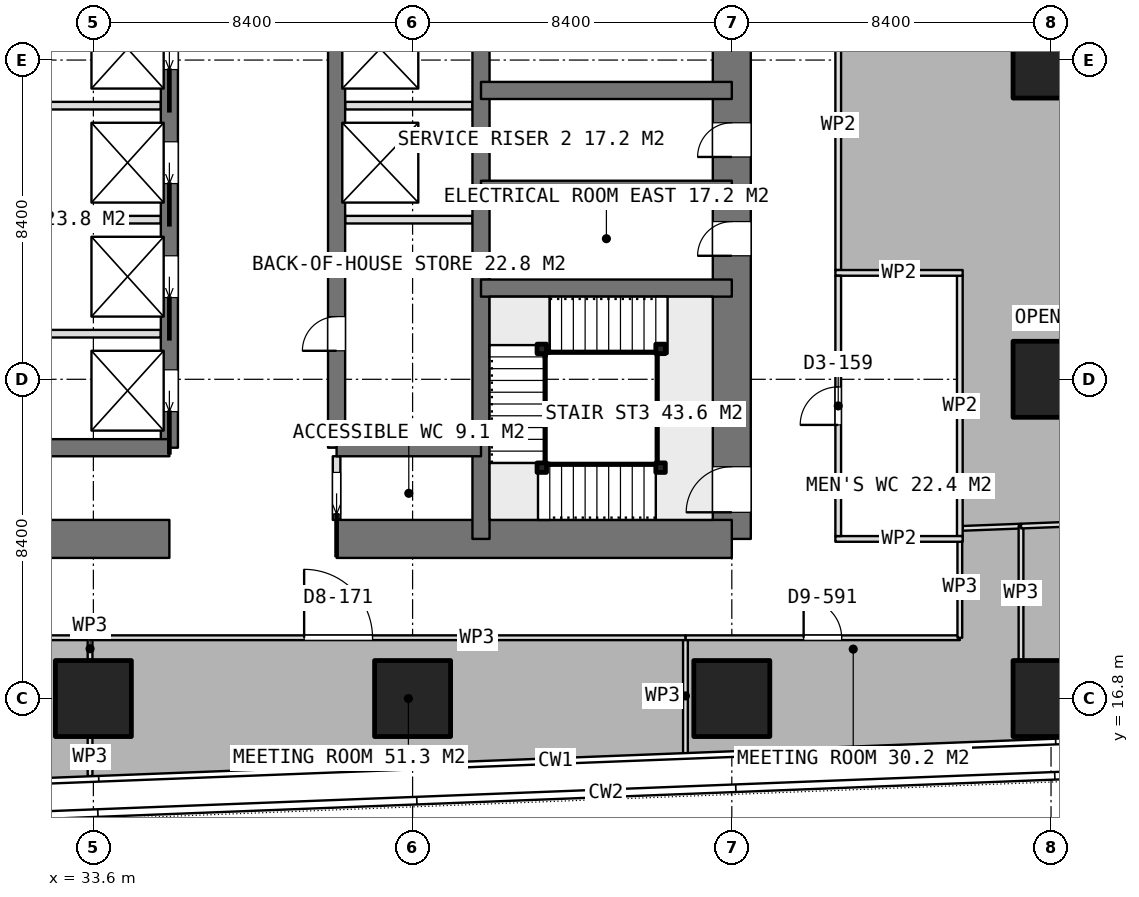
"""IFC4 building model, lengths in metres.
Left out: names, types, materials, properties, quantities, classifications, styles, units other than length and angle.
Written with IfcOpenShell. Run it as: python <this file> out.ifc"""

import sys

from ifc_helpers import new_model, si_unit, direction, frame, frame_2d, origin, origin_2d, place, context, subcontext, project, spatial, rectangle, extrude, element, fill, save


model = new_model("IFC4")
c1 = context("Model", 3, precision=1e-05, world=origin(), true_north=direction((0.0, 1.0)))
c2 = subcontext(c1, "Body", "Model", "MODEL_VIEW")
j1 = project(units=[si_unit("LENGTHUNIT", "METRE"), si_unit("PLANEANGLEUNIT", "RADIAN")], contexts=[c1])
p1 = place(None, origin())
s1 = spatial("IfcSite", under=j1, at=p1, CompositionType="ELEMENT")
p2 = place(p1, origin())
s2 = spatial("IfcBuilding", under=s1, at=p2, CompositionType="ELEMENT")
p3 = place(p2, frame((0.0, 0.0, 147.8)))
s3 = spatial("IfcBuildingStorey", under=s2, at=p3, CompositionType="ELEMENT", Elevation=147.8)
p4 = place(p3, frame((25.2, 21.0, 0.0), z_axis=(0.0, 0.0, 1.0), x_axis=(1.0, 0.0, 0.0)))
e1 = element("IfcWall", 1, at=p4, inside=s3, PredefinedType="SHEAR", context=c2, shape_type="SweptSolid", body=[
    extrude(rectangle(XDim=10.4, YDim=1.0, at=frame_2d((5.2, 0.0))), origin(), (0.0, 0.0, 1.0), 3.75),
])
p5 = place(p3, frame((40.0, 21.0, 0.0), z_axis=(0.0, 0.0, 1.0), x_axis=(1.0, 0.0, 0.0)))
e2 = element("IfcWall", 2, at=p5, inside=s3, PredefinedType="SHEAR", context=c2, shape_type="SweptSolid", body=[
    extrude(rectangle(XDim=10.4, YDim=1.0, at=frame_2d((5.2, 0.0))), origin(), (0.0, 0.0, 1.0), 3.75),
])
p6 = place(p3, frame((50.4, 21.0, 0.0), z_axis=(0.0, 0.0, 1.0), x_axis=(0.0, 1.0, 0.0)))
e3 = element("IfcWall", 3, at=p6, inside=s3, PredefinedType="SHEAR", context=c2, shape_type="SweptSolid", body=[
    extrude(rectangle(XDim=25.2, YDim=1.0, at=frame_2d((12.6, 0.0))), origin(), (0.0, 0.0, 1.0), 3.75),
])
p7 = place(p6, frame((16.2, 0.0, 0.0)))
e4 = element("IfcOpeningElement", 4, at=p7, cuts=e3, PredefinedType="OPENING", context=c2, shape_type="SweptSolid", body=[
    extrude(rectangle(XDim=1.2, YDim=2.1, at=frame_2d((0.6, 1.05))), frame((0.0, 0.51, 0.0), z_axis=(0.0, -1.0, 0.0), x_axis=(1.0, 0.0, 0.0)), (0.0, 0.0, 1.0), 1.02),
])
p8 = place(p6, frame((10.05, 0.0, 0.0)))
e5 = element("IfcOpeningElement", 5, at=p8, cuts=e3, PredefinedType="OPENING", context=c2, shape_type="SweptSolid", body=[
    extrude(rectangle(XDim=0.9, YDim=2.1, at=frame_2d((0.45, 1.05))), frame((0.0, 0.51, 0.0), z_axis=(0.0, -1.0, 0.0), x_axis=(1.0, 0.0, 0.0)), (0.0, 0.0, 1.0), 1.02),
])
p9 = place(p6, frame((7.45, 0.0, 0.0)))
e6 = element("IfcOpeningElement", 6, at=p9, cuts=e3, PredefinedType="OPENING", context=c2, shape_type="SweptSolid", body=[
    extrude(rectangle(XDim=0.9, YDim=2.1, at=frame_2d((0.45, 1.05))), frame((0.0, 0.51, 0.0), z_axis=(0.0, -1.0, 0.0), x_axis=(1.0, 0.0, 0.0)), (0.0, 0.0, 1.0), 1.02),
])
p10 = place(p6, frame((0.7, 0.0, 0.0)))
e7 = element("IfcOpeningElement", 7, at=p10, cuts=e3, PredefinedType="OPENING", context=c2, shape_type="SweptSolid", body=[
    extrude(rectangle(XDim=1.2, YDim=2.1, at=frame_2d((0.6, 1.05))), frame((0.0, 0.51, 0.0), z_axis=(0.0, -1.0, 0.0), x_axis=(1.0, 0.0, 0.0)), (0.0, 0.0, 1.0), 1.02),
])
p11 = place(p3, frame((43.8, 21.0, 0.0), z_axis=(0.0, 0.0, 1.0), x_axis=(0.0, 1.0, 0.0)))
e8 = element("IfcWall", 8, at=p11, inside=s3, PredefinedType="SHEAR", context=c2, shape_type="SweptSolid", body=[
    extrude(rectangle(XDim=25.2, YDim=0.45, at=frame_2d((12.6, 0.0))), origin(), (0.0, 0.0, 1.0), 3.75),
])
p12 = place(p3, frame((35.6, 23.4, 0.0), z_axis=(0.0, 0.0, 1.0), x_axis=(0.0, 1.0, 0.0)))
e9 = element("IfcWall", 9, at=p12, inside=s3, PredefinedType="SHEAR", context=c2, shape_type="SweptSolid", body=[
    extrude(rectangle(XDim=18.0, YDim=0.45, at=frame_2d((9.0, 0.0))), origin(), (0.0, 0.0, 1.0), 3.75),
])
p13 = place(p12, frame((0.95, 0.0, 0.0)))
e10 = element("IfcOpeningElement", 10, at=p13, cuts=e9, PredefinedType="OPENING", context=c2, shape_type="SweptSolid", body=[
    extrude(rectangle(XDim=1.1, YDim=2.1, at=frame_2d((0.55, 1.05))), frame((0.0, 0.235, 0.0), z_axis=(0.0, -1.0, 0.0), x_axis=(1.0, 0.0, 0.0)), (0.0, 0.0, 1.0), 0.47),
])
p14 = place(p12, frame((3.95, 0.0, 0.0)))
e11 = element("IfcOpeningElement", 11, at=p14, cuts=e9, PredefinedType="OPENING", context=c2, shape_type="SweptSolid", body=[
    extrude(rectangle(XDim=1.1, YDim=2.1, at=frame_2d((0.55, 1.05))), frame((0.0, 0.235, 0.0), z_axis=(0.0, -1.0, 0.0), x_axis=(1.0, 0.0, 0.0)), (0.0, 0.0, 1.0), 0.47),
])
p15 = place(p12, frame((6.95, 0.0, 0.0)))
e12 = element("IfcOpeningElement", 12, at=p15, cuts=e9, PredefinedType="OPENING", context=c2, shape_type="SweptSolid", body=[
    extrude(rectangle(XDim=1.1, YDim=2.1, at=frame_2d((0.55, 1.05))), frame((0.0, 0.235, 0.0), z_axis=(0.0, -1.0, 0.0), x_axis=(1.0, 0.0, 0.0)), (0.0, 0.0, 1.0), 0.47),
])
p16 = place(p12, frame((9.95, 0.0, 0.0)))
e13 = element("IfcOpeningElement", 13, at=p16, cuts=e9, PredefinedType="OPENING", context=c2, shape_type="SweptSolid", body=[
    extrude(rectangle(XDim=1.1, YDim=2.1, at=frame_2d((0.55, 1.05))), frame((0.0, 0.235, 0.0), z_axis=(0.0, -1.0, 0.0), x_axis=(1.0, 0.0, 0.0)), (0.0, 0.0, 1.0), 0.47),
])
p17 = place(p12, frame((12.95, 0.0, 0.0)))
e14 = element("IfcOpeningElement", 14, at=p17, cuts=e9, PredefinedType="OPENING", context=c2, shape_type="SweptSolid", body=[
    extrude(rectangle(XDim=1.1, YDim=2.1, at=frame_2d((0.55, 1.05))), frame((0.0, 0.235, 0.0), z_axis=(0.0, -1.0, 0.0), x_axis=(1.0, 0.0, 0.0)), (0.0, 0.0, 1.0), 0.47),
])
p18 = place(p12, frame((15.95, 0.0, 0.0)))
e15 = element("IfcOpeningElement", 15, at=p18, cuts=e9, PredefinedType="OPENING", context=c2, shape_type="SweptSolid", body=[
    extrude(rectangle(XDim=1.1, YDim=2.1, at=frame_2d((0.55, 1.05))), frame((0.0, 0.235, 0.0), z_axis=(0.0, -1.0, 0.0), x_axis=(1.0, 0.0, 0.0)), (0.0, 0.0, 1.0), 0.47),
])
p19 = place(p3, frame((40.0, 23.4, 0.0), z_axis=(0.0, 0.0, 1.0), x_axis=(0.0, 1.0, 0.0)))
e16 = element("IfcWall", 16, at=p19, inside=s3, PredefinedType="SHEAR", context=c2, shape_type="SweptSolid", body=[
    extrude(rectangle(XDim=18.0, YDim=0.45, at=frame_2d((9.0, 0.0))), origin(), (0.0, 0.0, 1.0), 3.75),
])
p20 = place(p19, frame((2.55, 0.0, 0.0)))
e17 = element("IfcOpeningElement", 17, at=p20, cuts=e16, PredefinedType="OPENING", context=c2, shape_type="SweptSolid", body=[
    extrude(rectangle(XDim=0.9, YDim=2.1, at=frame_2d((0.45, 1.05))), frame((0.0, 0.235, 0.0), z_axis=(0.0, -1.0, 0.0), x_axis=(1.0, 0.0, 0.0)), (0.0, 0.0, 1.0), 0.47),
])
for number, where, z_axis, x_axis in (
    (18, (31.8, 23.4, 0.0), (0.0, 0.0, 1.0), (1.0, 0.0, 0.0)),
    (19, (40.0, 23.4, 0.0), (0.0, 0.0, 1.0), (1.0, 0.0, 0.0)),
):
    element("IfcWall", number, at=place(p3, frame(where, z_axis=z_axis, x_axis=x_axis)), inside=s3, PredefinedType="SHEAR", context=c2, shape_type="SweptSolid", body=[
        extrude(rectangle(XDim=3.8, YDim=0.45, at=frame_2d((1.9, 0.0))), origin(), (0.0, 0.0, 1.0), 3.75),
    ])
for number, where, z_axis, x_axis in (
    (20, (43.8, 27.6, 0.0), (0.0, 0.0, 1.0), (1.0, 0.0, 0.0)),
    (21, (43.8, 30.2, 0.0), (0.0, 0.0, 1.0), (1.0, 0.0, 0.0)),
    (22, (43.8, 32.8, 0.0), (0.0, 0.0, 1.0), (1.0, 0.0, 0.0)),
):
    element("IfcWall", number, at=place(p3, frame(where, z_axis=z_axis, x_axis=x_axis)), inside=s3, PredefinedType="SHEAR", context=c2, shape_type="SweptSolid", body=[
        extrude(rectangle(XDim=6.6, YDim=0.45, at=frame_2d((3.3, 0.0))), origin(), (0.0, 0.0, 1.0), 3.75),
    ])
for number, where, z_axis, x_axis in (
    (23, (33.6, 16.8, 0.0), (0.0, 0.0, 1.0), (1.0, 0.0, 0.0)),
    (24, (42.0, 16.8, 0.0), (0.0, 0.0, 1.0), (1.0, 0.0, 0.0)),
    (25, (50.4, 16.8, 0.0), (0.0, 0.0, 1.0), (1.0, 0.0, 0.0)),
    (26, (58.8, 16.8, 0.0), (0.0, 0.0, 1.0), (1.0, 0.0, 0.0)),
    (27, (58.8, 25.2, 0.0), (0.0, 0.0, 1.0), (1.0, 0.0, 0.0)),
    (28, (58.8, 33.6, 0.0), (0.0, 0.0, 1.0), (1.0, 0.0, 0.0)),
):
    element("IfcColumn", number, at=place(p3, frame(where, z_axis=z_axis, x_axis=x_axis)), inside=s3, PredefinedType="COLUMN", context=c2, shape_type="SweptSolid", body=[
        extrude(rectangle(XDim=2.0, YDim=2.0, at=origin_2d()), origin(), (0.0, 0.0, 1.0), 3.75),
    ])
for number, where, z_axis, x_axis in (
    (29, (32.025, 26.4, 0.0), (0.0, 0.0, 1.0), (1.0, 0.0, 0.0)),
    (30, (32.025, 29.4, 0.0), (0.0, 0.0, 1.0), (1.0, 0.0, 0.0)),
    (31, (32.025, 32.4, 0.0), (0.0, 0.0, 1.0), (1.0, 0.0, 0.0)),
):
    element("IfcWall", number, at=place(p3, frame(where, z_axis=z_axis, x_axis=x_axis)), inside=s3, PredefinedType="PARTITIONING", context=c2, shape_type="SweptSolid", body=[
        extrude(rectangle(XDim=3.35, YDim=0.2, at=frame_2d((1.675, 0.0))), origin(), (0.0, 0.0, 1.0), 3.5),
    ])
for number, where, z_axis, x_axis in (
    (32, (40.225, 29.4, 0.0), (0.0, 0.0, 1.0), (1.0, 0.0, 0.0)),
    (33, (40.225, 32.4, 0.0), (0.0, 0.0, 1.0), (1.0, 0.0, 0.0)),
):
    element("IfcWall", number, at=place(p3, frame(where, z_axis=z_axis, x_axis=x_axis)), inside=s3, PredefinedType="PARTITIONING", context=c2, shape_type="SweptSolid", body=[
        extrude(rectangle(XDim=3.35, YDim=0.2, at=frame_2d((1.675, 0.0))), origin(), (0.0, 0.0, 1.0), 3.5),
    ])
p21 = place(p3, frame((40.0, 21.5, 0.0), z_axis=(0.0, 0.0, 1.0), x_axis=(0.0, 1.0, 0.0)))
e34 = element("IfcWall", 34, at=p21, inside=s3, PredefinedType="PARTITIONING", context=c2, shape_type="SweptSolid", body=[
    extrude(rectangle(XDim=1.675, YDim=0.2, at=frame_2d((0.837, 0.0))), origin(), (0.0, 0.0, 1.0), 3.5),
])
p22 = place(p21, frame((0.15, 0.0, 0.0)))
e35 = element("IfcOpeningElement", 35, at=p22, cuts=e34, PredefinedType="OPENING", context=c2, shape_type="SweptSolid", body=[
    extrude(rectangle(XDim=1.1, YDim=2.1, at=frame_2d((0.55, 1.05))), frame((0.0, 0.11, 0.0), z_axis=(0.0, -1.0, 0.0), x_axis=(1.0, 0.0, 0.0)), (0.0, 0.0, 1.0), 0.22),
])
for number, where, z_axis, x_axis in (
    (36, (53.125, 21.0, 0.0), (0.0, 0.0, 1.0), (1.0, 0.0, 0.0)),
    (37, (53.125, 28.0, 0.0), (0.0, 0.0, 1.0), (1.0, 0.0, 0.0)),
):
    element("IfcWall", number, at=place(p3, frame(where, z_axis=z_axis, x_axis=x_axis)), inside=s3, PredefinedType="PARTITIONING", context=c2, shape_type="SweptSolid", body=[
        extrude(rectangle(XDim=3.35, YDim=0.15, at=frame_2d((1.675, 0.0))), origin(), (0.0, 0.0, 1.0), 3.5),
    ])
p23 = place(p3, frame((53.2, 21.075, 0.0), z_axis=(0.0, 0.0, 1.0), x_axis=(0.0, 1.0, 0.0)))
e38 = element("IfcWall", 38, at=p23, inside=s3, PredefinedType="PARTITIONING", context=c2, shape_type="SweptSolid", body=[
    extrude(rectangle(XDim=6.85, YDim=0.15, at=frame_2d((3.425, 0.0))), origin(), (0.0, 0.0, 1.0), 3.5),
])
p24 = place(p23, frame((2.925, 0.0, 0.0)))
e39 = element("IfcOpeningElement", 39, at=p24, cuts=e38, PredefinedType="OPENING", context=c2, shape_type="SweptSolid", body=[
    extrude(rectangle(XDim=1.0, YDim=2.1, at=frame_2d((0.5, 1.05))), frame((0.0, 0.085, 0.0), z_axis=(0.0, -1.0, 0.0), x_axis=(1.0, 0.0, 0.0)), (0.0, 0.0, 1.0), 0.17),
])
p25 = place(p3, frame((56.4, 21.075, 0.0), z_axis=(0.0, 0.0, 1.0), x_axis=(0.0, 1.0, 0.0)))
e40 = element("IfcWall", 40, at=p25, inside=s3, PredefinedType="PARTITIONING", context=c2, shape_type="SweptSolid", body=[
    extrude(rectangle(XDim=6.85, YDim=0.15, at=frame_2d((3.425, 0.0))), origin(), (0.0, 0.0, 1.0), 3.5),
])
p26 = place(p3, frame((56.475, 21.278, 0.0), z_axis=(0.0, 0.0, 1.0), x_axis=(0.999266096652, 0.038304935469, 0.0)))
e41 = element("IfcWall", 41, at=p26, inside=s3, PredefinedType="PARTITIONING", context=c2, shape_type="SweptSolid", body=[
    extrude(rectangle(XDim=1.536, YDim=0.125, at=frame_2d((0.768, 0.0))), origin(), (0.0, 0.0, 1.0), 3.5),
])
p27 = place(p3, frame((58.01, 21.337, 0.0), z_axis=(0.0, 0.0, 1.0), x_axis=(0.0, -1.0, 0.0)))
e42 = element("IfcWall", 42, at=p27, inside=s3, PredefinedType="PARTITIONING", context=c2, shape_type="SweptSolid", body=[
    extrude(rectangle(XDim=3.517, YDim=0.125, at=frame_2d((1.758, 0.0))), origin(), (0.0, 0.0, 1.0), 3.5),
])
p28 = place(p3, frame((49.18, 15.339, 0.0), z_axis=(0.0, 0.0, 1.0), x_axis=(0.0, 1.0, 0.0)))
e43 = element("IfcWall", 43, at=p28, inside=s3, PredefinedType="PARTITIONING", context=c2, shape_type="SweptSolid", body=[
    extrude(rectangle(XDim=3.061, YDim=0.125, at=frame_2d((1.53, 0.0))), origin(), (0.0, 0.0, 1.0), 3.5),
])
p29 = place(p3, frame((49.18, 18.4, 0.0), z_axis=(0.0, 0.0, 1.0), x_axis=(1.0, 0.0, 0.0)))
e44 = element("IfcWall", 44, at=p29, inside=s3, PredefinedType="PARTITIONING", context=c2, shape_type="SweptSolid", body=[
    extrude(rectangle(XDim=7.22, YDim=0.125, at=frame_2d((3.61, 0.0))), origin(), (0.0, 0.0, 1.0), 3.5),
])
p30 = place(p29, frame((3.11, 0.0, 0.0)))
e45 = element("IfcOpeningElement", 45, at=p30, cuts=e44, PredefinedType="OPENING", context=c2, shape_type="SweptSolid", body=[
    extrude(rectangle(XDim=1.0, YDim=2.1, at=frame_2d((0.5, 1.05))), frame((0.0, 0.073, 0.0), z_axis=(0.0, -1.0, 0.0), x_axis=(1.0, 0.0, 0.0)), (0.0, 0.0, 1.0), 0.145),
])
p31 = place(p3, frame((56.4, 18.4, 0.0), z_axis=(0.0, 0.0, 1.0), x_axis=(0.0, 1.0, 0.0)))
e46 = element("IfcWall", 46, at=p31, inside=s3, PredefinedType="PARTITIONING", context=c2, shape_type="SweptSolid", body=[
    extrude(rectangle(XDim=2.674, YDim=0.125, at=frame_2d((1.337, 0.0))), origin(), (0.0, 0.0, 1.0), 3.5),
])
p32 = place(p3, frame((58.011, 21.338, 0.0), z_axis=(0.0, 0.0, 1.0), x_axis=(0.999247292376, 0.038792379151, 0.0)))
e47 = element("IfcWall", 47, at=p32, inside=s3, PredefinedType="PARTITIONING", context=c2, shape_type="SweptSolid", body=[
    extrude(rectangle(XDim=4.619, YDim=0.125, at=frame_2d((2.31, 0.0))), origin(), (0.0, 0.0, 1.0), 3.5),
])
p33 = place(p3, frame((25.38, 18.4, 0.0), z_axis=(0.0, 0.0, 1.0), x_axis=(1.0, 0.0, 0.0)))
e48 = element("IfcWall", 48, at=p33, inside=s3, PredefinedType="PARTITIONING", context=c2, shape_type="SweptSolid", body=[
    extrude(rectangle(XDim=8.133, YDim=0.125, at=frame_2d((4.066, 0.0))), origin(), (0.0, 0.0, 1.0), 3.5),
])
p34 = place(p33, frame((3.567, 0.0, 0.0)))
e49 = element("IfcOpeningElement", 49, at=p34, cuts=e48, PredefinedType="OPENING", context=c2, shape_type="SweptSolid", body=[
    extrude(rectangle(XDim=1.0, YDim=2.1, at=frame_2d((0.5, 1.05))), frame((0.0, 0.073, 0.0), z_axis=(0.0, -1.0, 0.0), x_axis=(1.0, 0.0, 0.0)), (0.0, 0.0, 1.0), 0.145),
])
p35 = place(p3, frame((33.513, 18.4, 0.0), z_axis=(0.0, 0.0, 1.0), x_axis=(0.0, -1.0, 0.0)))
e50 = element("IfcWall", 50, at=p35, inside=s3, PredefinedType="PARTITIONING", context=c2, shape_type="SweptSolid", body=[
    extrude(rectangle(XDim=0.58, YDim=0.125, at=frame_2d((0.29, 0.0))), origin(), (0.0, 0.0, 1.0), 3.5),
])
p36 = place(p3, frame((33.513, 15.78, 0.0), z_axis=(0.0, 0.0, 1.0), x_axis=(0.0, -1.0, 0.0)))
e51 = element("IfcWall", 51, at=p36, inside=s3, PredefinedType="PARTITIONING", context=c2, shape_type="SweptSolid", body=[
    extrude(rectangle(XDim=1.02, YDim=0.125, at=frame_2d((0.51, 0.0))), origin(), (0.0, 0.0, 1.0), 3.5),
])
p37 = place(p3, frame((53.2, 28.075, 0.0), z_axis=(0.0, 0.0, 1.0), x_axis=(0.0, 1.0, 0.0)))
e52 = element("IfcWall", 52, at=p37, inside=s3, PredefinedType="PARTITIONING", context=c2, shape_type="SweptSolid", body=[
    extrude(rectangle(XDim=7.615, YDim=0.15, at=frame_2d((3.808, 0.0))), origin(), (0.0, 0.0, 1.0), 3.5),
])
p38 = place(p3, frame((33.513, 18.4, 0.0), z_axis=(0.0, 0.0, 1.0), x_axis=(1.0, 0.0, 0.0)))
e53 = element("IfcWall", 53, at=p38, inside=s3, PredefinedType="PARTITIONING", context=c2, shape_type="SweptSolid", body=[
    extrude(rectangle(XDim=15.666, YDim=0.125, at=frame_2d((7.833, 0.0))), origin(), (0.0, 0.0, 1.0), 3.5),
])
p39 = place(p38, frame((5.633, 0.0, 0.0)))
e54 = element("IfcOpeningElement", 54, at=p39, cuts=e53, PredefinedType="OPENING", context=c2, shape_type="SweptSolid", body=[
    extrude(rectangle(XDim=1.8, YDim=2.1, at=frame_2d((0.9, 1.05))), frame((0.0, 0.073, 0.0), z_axis=(0.0, -1.0, 0.0), x_axis=(1.0, 0.0, 0.0)), (0.0, 0.0, 1.0), 0.145),
])
for number, where, z_axis, x_axis in (
    (55, (48.525, 22.875, 0.0), (0.0, 0.0, 1.0), (1.0, 0.0, 0.0)),
    (56, (45.4, 22.875, 0.0), (0.0, 0.0, 1.0), (1.0, 0.0, 0.0)),
    (57, (45.4, 26.0, 0.0), (0.0, 0.0, 1.0), (1.0, 0.0, 0.0)),
    (58, (48.525, 26.0, 0.0), (0.0, 0.0, 1.0), (1.0, 0.0, 0.0)),
):
    element("IfcColumn", number, at=place(p3, frame(where, z_axis=z_axis, x_axis=x_axis)), inside=s3, PredefinedType="COLUMN", context=c2, shape_type="SweptSolid", body=[
        extrude(rectangle(XDim=0.25, YDim=0.25, at=origin_2d()), origin(), (0.0, 0.0, 1.0), 3.75),
    ])
p40 = place(p8, origin())
e59 = element("IfcDoor", 59, at=p40, inside=s3, OperationType="SINGLE_SWING_LEFT", PredefinedType="DOOR", context=c2, shape_type="SweptSolid", body=[
    extrude(rectangle(XDim=0.9, YDim=2.1, at=frame_2d((0.45, 1.05))), frame((0.0, 0.025, 0.0), z_axis=(0.0, -1.0, 0.0), x_axis=(1.0, 0.0, 0.0)), (0.0, 0.0, 1.0), 0.05),
])
fill(e5, e59)
p41 = place(p9, origin())
e60 = element("IfcDoor", 60, at=p41, inside=s3, OperationType="SINGLE_SWING_LEFT", PredefinedType="DOOR", context=c2, shape_type="SweptSolid", body=[
    extrude(rectangle(XDim=0.9, YDim=2.1, at=frame_2d((0.45, 1.05))), frame((0.0, 0.025, 0.0), z_axis=(0.0, -1.0, 0.0), x_axis=(1.0, 0.0, 0.0)), (0.0, 0.0, 1.0), 0.05),
])
fill(e6, e60)
p42 = place(p22, origin())
e61 = element("IfcDoor", 61, at=p42, inside=s3, OperationType="SLIDING_TO_LEFT", PredefinedType="DOOR", context=c2, shape_type="SweptSolid", body=[
    extrude(rectangle(XDim=1.1, YDim=2.1, at=frame_2d((0.55, 1.05))), frame((0.0, 0.025, 0.0), z_axis=(0.0, -1.0, 0.0), x_axis=(1.0, 0.0, 0.0)), (0.0, 0.0, 1.0), 0.05),
])
fill(e35, e61)
p43 = place(p20, origin())
e62 = element("IfcDoor", 62, at=p43, inside=s3, OperationType="SINGLE_SWING_LEFT", PredefinedType="DOOR", context=c2, shape_type="SweptSolid", body=[
    extrude(rectangle(XDim=0.9, YDim=2.1, at=frame_2d((0.45, 1.05))), frame((0.0, 0.025, 0.0), z_axis=(0.0, -1.0, 0.0), x_axis=(1.0, 0.0, 0.0)), (0.0, 0.0, 1.0), 0.05),
])
fill(e17, e62)
p44 = place(p13, origin())
e63 = element("IfcDoor", 63, at=p44, inside=s3, OperationType="SLIDING_TO_LEFT", PredefinedType="USERDEFINED", context=c2, shape_type="SweptSolid", body=[
    extrude(rectangle(XDim=1.1, YDim=2.1, at=frame_2d((0.55, 1.05))), frame((0.0, 0.025, 0.0), z_axis=(0.0, -1.0, 0.0), x_axis=(1.0, 0.0, 0.0)), (0.0, 0.0, 1.0), 0.05),
])
fill(e10, e63)
p45 = place(p14, origin())
e64 = element("IfcDoor", 64, at=p45, inside=s3, OperationType="SLIDING_TO_LEFT", PredefinedType="USERDEFINED", context=c2, shape_type="SweptSolid", body=[
    extrude(rectangle(XDim=1.1, YDim=2.1, at=frame_2d((0.55, 1.05))), frame((0.0, 0.025, 0.0), z_axis=(0.0, -1.0, 0.0), x_axis=(1.0, 0.0, 0.0)), (0.0, 0.0, 1.0), 0.05),
])
fill(e11, e64)
p46 = place(p15, origin())
e65 = element("IfcDoor", 65, at=p46, inside=s3, OperationType="SLIDING_TO_LEFT", PredefinedType="USERDEFINED", context=c2, shape_type="SweptSolid", body=[
    extrude(rectangle(XDim=1.1, YDim=2.1, at=frame_2d((0.55, 1.05))), frame((0.0, 0.025, 0.0), z_axis=(0.0, -1.0, 0.0), x_axis=(1.0, 0.0, 0.0)), (0.0, 0.0, 1.0), 0.05),
])
fill(e12, e65)
p47 = place(p16, origin())
e66 = element("IfcDoor", 66, at=p47, inside=s3, OperationType="SLIDING_TO_LEFT", PredefinedType="USERDEFINED", context=c2, shape_type="SweptSolid", body=[
    extrude(rectangle(XDim=1.1, YDim=2.1, at=frame_2d((0.55, 1.05))), frame((0.0, 0.025, 0.0), z_axis=(0.0, -1.0, 0.0), x_axis=(1.0, 0.0, 0.0)), (0.0, 0.0, 1.0), 0.05),
])
fill(e13, e66)
p48 = place(p24, origin())
e67 = element("IfcDoor", 67, at=p48, inside=s3, OperationType="SINGLE_SWING_LEFT", PredefinedType="DOOR", context=c2, shape_type="SweptSolid", body=[
    extrude(rectangle(XDim=1.0, YDim=2.1, at=frame_2d((0.5, 1.05))), frame((0.0, 0.025, 0.0), z_axis=(0.0, -1.0, 0.0), x_axis=(1.0, 0.0, 0.0)), (0.0, 0.0, 1.0), 0.05),
])
fill(e39, e67)
p49 = place(p30, origin())
e68 = element("IfcDoor", 68, at=p49, inside=s3, OperationType="SINGLE_SWING_LEFT", PredefinedType="DOOR", context=c2, shape_type="SweptSolid", body=[
    extrude(rectangle(XDim=1.0, YDim=2.1, at=frame_2d((0.5, 1.05))), frame((0.0, 0.025, 0.0), z_axis=(0.0, -1.0, 0.0), x_axis=(1.0, 0.0, 0.0)), (0.0, 0.0, 1.0), 0.05),
])
fill(e45, e68)
p50 = place(p39, origin())
e69 = element("IfcDoor", 69, at=p50, inside=s3, OperationType="DOUBLE_DOOR_SINGLE_SWING", PredefinedType="DOOR", context=c2, shape_type="SweptSolid", body=[
    extrude(rectangle(XDim=1.8, YDim=2.1, at=frame_2d((0.9, 1.05))), frame((0.0, 0.025, 0.0), z_axis=(0.0, -1.0, 0.0), x_axis=(1.0, 0.0, 0.0)), (0.0, 0.0, 1.0), 0.05),
])
fill(e54, e69)
p51 = place(p10, origin())
e70 = element("IfcDoor", 70, at=p51, inside=s3, OperationType="SINGLE_SWING_RIGHT", PredefinedType="DOOR", context=c2, shape_type="SweptSolid", body=[
    extrude(rectangle(XDim=1.2, YDim=2.1, at=frame_2d((0.6, 1.05))), frame((0.0, 0.025, 0.0), z_axis=(0.0, -1.0, 0.0), x_axis=(1.0, 0.0, 0.0)), (0.0, 0.0, 1.0), 0.05),
])
fill(e7, e70)
save(model, sys.argv[1])
